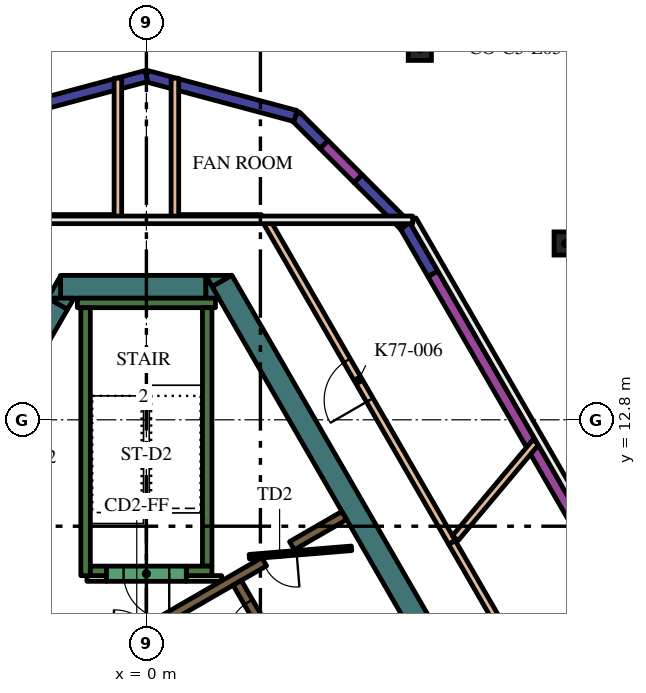
"""IFC4 building model, lengths in metres.
Left out: names, types, materials, properties, quantities, classifications, styles, units other than length and angle.
Written with IfcOpenShell. Run it as: python <this file> out.ifc"""

import sys

from ifc_helpers import new_model, si_unit, direction, frame, frame_2d, origin, origin_2d, place, context, subcontext, project, spatial, polyline, rectangle, hollow_circle, outline, extrude, element, fill, save


model = new_model("IFC4")
c1 = context("Model", 3, precision=1e-05, world=origin(), true_north=direction((0.0, 1.0)))
c2 = subcontext(c1, "Body", "Model", "MODEL_VIEW")
j1 = project(units=[si_unit("LENGTHUNIT", "METRE"), si_unit("PLANEANGLEUNIT", "RADIAN")], contexts=[c1])
p1 = place(None, origin())
s1 = spatial("IfcSite", under=j1, at=p1, CompositionType="ELEMENT")
p2 = place(p1, origin())
s2 = spatial("IfcBuilding", under=s1, at=p2, CompositionType="ELEMENT")
p3 = place(p2, frame((0.0, 0.0, 331.8)))
s3 = spatial("IfcBuildingStorey", under=s2, at=p3, CompositionType="ELEMENT", Elevation=331.8)
for number, where, z_axis, x_axis in (
    (1, (11.032, 17.44, 0.0), (0.0, 0.0, 1.0), (1.0, 0.0, 0.0)),
    (2, (7.195, 22.561, 0.0), (0.0, 0.0, 1.0), (1.0, 0.0, 0.0)),
):
    element("IfcColumn", number, at=place(p3, frame(where, z_axis=z_axis, x_axis=x_axis)), inside=s3, PredefinedType="COLUMN", context=c2, shape_type="SweptSolid", body=[
        extrude(hollow_circle(Radius=0.305, WallThickness=0.025, at=origin_2d()), origin(), (0.0, 0.0, 1.0), 4.2),
    ])
p4 = place(p3, frame((1.989, 16.456, 0.0), z_axis=(0.0, 0.0, 1.0), x_axis=(0.49999102663, -0.8660305845, 0.0)))
e3 = element("IfcWall", 3, at=p4, inside=s3, PredefinedType="SOLIDWALL", context=c2, shape_type="SweptSolid", body=[
    extrude(rectangle(XDim=12.406, YDim=0.6, at=frame_2d((6.203, 0.0))), origin(), (0.0, 0.0, 1.0), 4.2),
])
p5 = place(p3, origin())
e4 = element("IfcWall", 4, at=p5, inside=s3, PredefinedType="SOLIDWALL", context=c2, shape_type="SweptSolid", body=[
    extrude(outline(polyline([(1.559, 16.6), (2.235, 16.6), (1.728, 16.307), (1.559, 16.6)])), origin(), (0.0, 0.0, 1.0), 4.2),
])
p6 = place(p3, frame((-2.258, 16.3, 0.0), z_axis=(0.0, 0.0, 1.0), x_axis=(1.0, 0.0, 0.0)))
e5 = element("IfcWall", 5, at=p6, inside=s3, PredefinedType="SOLIDWALL", context=c2, shape_type="SweptSolid", body=[
    extrude(rectangle(XDim=3.823, YDim=0.6, at=frame_2d((1.912, 0.0))), origin(), (0.0, 0.0, 1.0), 4.2),
])
e6 = element("IfcWall", 6, at=p5, inside=s3, PredefinedType="SOLIDWALL", context=c2, shape_type="SweptSolid", body=[
    extrude(outline(polyline([(1.905, 16.0), (1.567, 16.0), (1.567, 16.585), (1.905, 16.0)])), origin(), (0.0, 0.0, 1.0), 4.2),
])
e7 = element("IfcWall", 7, at=p5, inside=s3, PredefinedType="SOLIDWALL", context=c2, shape_type="SweptSolid", body=[
    extrude(outline(polyline([(-2.598, 16.0), (-2.26, 16.585), (-2.26, 16.0), (-2.598, 16.0)])), origin(), (0.0, 0.0, 1.0), 4.2),
])
p7 = place(p3, frame((-2.335, 15.855, 0.0), z_axis=(0.0, 0.0, 1.0), x_axis=(-0.499960127962, -0.866048422692, 0.0)))
e8 = element("IfcWall", 8, at=p7, inside=s3, PredefinedType="SOLIDWALL", context=c2, shape_type="SweptSolid", body=[
    extrude(rectangle(XDim=2.934, YDim=0.6, at=frame_2d((1.467, 0.0))), origin(), (0.0, 0.0, 1.0), 4.2),
])
e9 = element("IfcWall", 9, at=p5, inside=s3, PredefinedType="SOLIDWALL", context=c2, shape_type="SweptSolid", body=[
    extrude(outline(polyline([(-1.905, 16.0), (-2.074, 15.707), (-2.581, 16.0), (-1.905, 16.0)])), origin(), (0.0, 0.0, 1.0), 4.2),
])
p8 = place(p3, frame((-1.817, 15.875, 0.0), z_axis=(0.0, 0.0, 1.0), x_axis=(1.0, 0.0, 0.0)))
e10 = element("IfcWall", 10, at=p8, inside=s3, PredefinedType="SOLIDWALL", context=c2, shape_type="SweptSolid", body=[
    extrude(rectangle(XDim=3.634, YDim=0.25, at=frame_2d((1.817, 0.0))), origin(), (0.0, 0.0, 1.0), 4.2),
])
p9 = place(p3, frame((1.6, 8.95, 0.0), z_axis=(0.0, 0.0, 1.0), x_axis=(0.0, 1.0, 0.0)))
e11 = element("IfcWall", 11, at=p9, inside=s3, PredefinedType="SOLIDWALL", context=c2, shape_type="SweptSolid", body=[
    extrude(rectangle(XDim=6.8, YDim=0.25, at=frame_2d((3.4, 0.0))), origin(), (0.0, 0.0, 1.0), 4.2),
])
p10 = place(p3, frame((1.05, 8.825, 0.0), z_axis=(0.0, 0.0, 1.0), x_axis=(1.0, 0.0, 0.0)))
e12 = element("IfcWall", 12, at=p10, inside=s3, PredefinedType="SOLIDWALL", context=c2, shape_type="SweptSolid", body=[
    extrude(rectangle(XDim=0.675, YDim=0.25, at=frame_2d((0.337, 0.0))), origin(), (0.0, 0.0, 1.0), 4.2),
])
p11 = place(p3, frame((-1.6, 8.7, 0.0), z_axis=(0.0, 0.0, 1.0), x_axis=(0.0, 1.0, 0.0)))
e13 = element("IfcWall", 13, at=p11, inside=s3, PredefinedType="SOLIDWALL", context=c2, shape_type="SweptSolid", body=[
    extrude(rectangle(XDim=7.05, YDim=0.25, at=frame_2d((3.525, 0.0))), origin(), (0.0, 0.0, 1.0), 4.2),
])
p12 = place(p3, frame((-1.475, 8.825, 0.0), z_axis=(0.0, 0.0, 1.0), x_axis=(1.0, 0.0, 0.0)))
e14 = element("IfcWall", 14, at=p12, inside=s3, PredefinedType="SOLIDWALL", context=c2, shape_type="SweptSolid", body=[
    extrude(rectangle(XDim=0.425, YDim=0.25, at=frame_2d((0.212, 0.0))), origin(), (0.0, 0.0, 1.0), 4.2),
])
p13 = place(p3, frame((3.1, 9.064, 0.0), z_axis=(0.0, 0.0, 1.0), x_axis=(-0.866033137035, -0.499986605379, 0.0)))
e15 = element("IfcWall", 15, at=p13, inside=s3, PredefinedType="SOLIDWALL", context=c2, shape_type="SweptSolid", body=[
    extrude(rectangle(XDim=3.467, YDim=0.25, at=frame_2d((1.733, 0.0))), origin(), (0.0, 0.0, 1.0), 4.2),
])
p14 = place(p3, frame((3.83, 9.486, 0.0), z_axis=(0.0, 0.0, 1.0), x_axis=(0.865986202621, 0.500067892261, 0.0)))
e16 = element("IfcWall", 16, at=p14, inside=s3, PredefinedType="SOLIDWALL", context=c2, shape_type="SweptSolid", body=[
    extrude(rectangle(XDim=1.591, YDim=0.25, at=frame_2d((0.795, 0.0))), origin(), (0.0, 0.0, 1.0), 4.2),
])
p15 = place(p3, frame((1.05, 8.625, 0.0), z_axis=(0.0, 0.0, 1.0), x_axis=(1.0, 0.0, 0.0)))
e17 = element("IfcWall", 17, at=p15, inside=s3, PredefinedType="PARTITIONING", context=c2, shape_type="SweptSolid", body=[
    extrude(rectangle(XDim=0.929, YDim=0.15, at=frame_2d((0.464, 0.0))), origin(), (0.0, 0.0, 1.0), 3.45),
])
p16 = place(p3, frame((-1.564, 8.625, 0.0), z_axis=(0.0, 0.0, 1.0), x_axis=(1.0, 0.0, 0.0)))
e18 = element("IfcWall", 18, at=p16, inside=s3, PredefinedType="PARTITIONING", context=c2, shape_type="SweptSolid", body=[
    extrude(rectangle(XDim=0.514, YDim=0.15, at=frame_2d((0.257, 0.0))), origin(), (0.0, 0.0, 1.0), 3.45),
])
p17 = place(p3, frame((8.565, -2.185, 0.0), z_axis=(0.0, 0.0, 1.0), x_axis=(-0.499997954832, 0.866026584559, 0.0)))
e19 = element("IfcWall", 19, at=p17, inside=s3, PredefinedType="SOLIDWALL", context=c2, shape_type="SweptSolid", body=[
    extrude(rectangle(XDim=12.35, YDim=0.25, at=frame_2d((6.175, 0.0))), origin(), (0.0, 0.0, 1.0), 4.2),
])
p18 = place(p17, frame((0.685, 0.0, 0.0)))
e20 = element("IfcOpeningElement", 20, at=p18, cuts=e19, PredefinedType="OPENING", context=c2, shape_type="SweptSolid", body=[
    extrude(rectangle(XDim=0.9, YDim=2.1, at=frame_2d((0.45, 1.05))), frame((0.0, 0.135, 0.0), z_axis=(0.0, -1.0, 0.0), x_axis=(1.0, 0.0, 0.0)), (0.0, 0.0, 1.0), 0.27),
])
p19 = place(p17, frame((3.105, 0.0, 0.0)))
e21 = element("IfcOpeningElement", 21, at=p19, cuts=e19, PredefinedType="OPENING", context=c2, shape_type="SweptSolid", body=[
    extrude(rectangle(XDim=1.1, YDim=2.1, at=frame_2d((0.55, 1.05))), frame((0.0, 0.135, 0.0), z_axis=(0.0, -1.0, 0.0), x_axis=(1.0, 0.0, 0.0)), (0.0, 0.0, 1.0), 0.27),
])
p20 = place(p17, frame((5.625, 0.0, 0.0)))
e22 = element("IfcOpeningElement", 22, at=p20, cuts=e19, PredefinedType="OPENING", context=c2, shape_type="SweptSolid", body=[
    extrude(rectangle(XDim=1.1, YDim=2.1, at=frame_2d((0.55, 1.05))), frame((0.0, 0.135, 0.0), z_axis=(0.0, -1.0, 0.0), x_axis=(1.0, 0.0, 0.0)), (0.0, 0.0, 1.0), 0.27),
])
p21 = place(p17, frame((8.145, 0.0, 0.0)))
e23 = element("IfcOpeningElement", 23, at=p21, cuts=e19, PredefinedType="OPENING", context=c2, shape_type="SweptSolid", body=[
    extrude(rectangle(XDim=1.1, YDim=2.1, at=frame_2d((0.55, 1.05))), frame((0.0, 0.135, 0.0), z_axis=(0.0, -1.0, 0.0), x_axis=(1.0, 0.0, 0.0)), (0.0, 0.0, 1.0), 0.27),
])
p22 = place(p17, frame((10.665, 0.0, 0.0)))
e24 = element("IfcOpeningElement", 24, at=p22, cuts=e19, PredefinedType="OPENING", context=c2, shape_type="SweptSolid", body=[
    extrude(rectangle(XDim=1.1, YDim=2.1, at=frame_2d((0.55, 1.05))), frame((0.0, 0.135, 0.0), z_axis=(0.0, -1.0, 0.0), x_axis=(1.0, 0.0, 0.0)), (0.0, 0.0, 1.0), 0.27),
])
p23 = place(p3, frame((1.05, 8.75, 0.0), z_axis=(0.0, 0.0, 1.0), x_axis=(-1.0, 0.0, 0.0)))
e25 = element("IfcWall", 25, at=p23, inside=s3, PredefinedType="SOLIDWALL", context=c2, shape_type="SweptSolid", body=[
    extrude(rectangle(XDim=2.1, YDim=0.4, at=frame_2d((1.05, 0.0))), origin(), (0.0, 0.0, 1.0), 4.2),
])
p24 = place(p23, frame((0.45, 0.0, 0.0)))
e26 = element("IfcOpeningElement", 26, at=p24, cuts=e25, PredefinedType="OPENING", context=c2, shape_type="SweptSolid", body=[
    extrude(rectangle(XDim=1.2, YDim=2.1, at=frame_2d((0.6, 1.05))), frame((0.0, 0.21, 0.0), z_axis=(0.0, -1.0, 0.0), x_axis=(1.0, 0.0, 0.0)), (0.0, 0.0, 1.0), 0.42),
])
p25 = place(p3, frame((5.398, 9.419, 0.0), z_axis=(0.0, 0.0, 1.0), x_axis=(-0.996653416376, -0.081743303248, 0.0)))
e27 = element("IfcWall", 27, at=p25, inside=s3, PredefinedType="PARTITIONING", context=c2, shape_type="SweptSolid", body=[
    extrude(rectangle(XDim=2.7, YDim=0.12, at=frame_2d((1.35, 0.0))), origin(), (0.0, 0.0, 1.0), 3.45),
])
p26 = place(p25, frame((1.45, 0.0, 0.0)))
e28 = element("IfcOpeningElement", 28, at=p26, cuts=e27, PredefinedType="OPENING", context=c2, shape_type="SweptSolid", body=[
    extrude(rectangle(XDim=0.9, YDim=2.1, at=frame_2d((0.45, 1.05))), frame((0.0, 0.07, 0.0), z_axis=(0.0, -1.0, 0.0), x_axis=(1.0, 0.0, 0.0)), (0.0, 0.0, 1.0), 0.14),
])
p27 = place(p3, frame((8.038, 9.579, 0.0), z_axis=(0.0, 0.0, 1.0), x_axis=(-0.500003092839, 0.866023618125, 0.0)))
e29 = element("IfcWall", 29, at=p27, inside=s3, PredefinedType="PARTITIONING", context=c2, shape_type="SweptSolid", body=[
    extrude(rectangle(XDim=9.84, YDim=0.2, at=frame_2d((4.92, 0.0))), origin(), (0.0, 0.0, 1.0), 3.45),
])
p28 = place(p27, frame((4.32, 0.0, 0.0)))
e30 = element("IfcOpeningElement", 30, at=p28, cuts=e29, PredefinedType="OPENING", context=c2, shape_type="SweptSolid", body=[
    extrude(rectangle(XDim=1.2, YDim=2.1, at=frame_2d((0.6, 1.05))), frame((0.0, 0.11, 0.0), z_axis=(0.0, -1.0, 0.0), x_axis=(1.0, 0.0, 0.0)), (0.0, 0.0, 1.0), 0.22),
])
p29 = place(p3, frame((12.309, 2.18, 0.0), z_axis=(0.0, 0.0, 1.0), x_axis=(-0.499966798825, 0.866044571643, 0.0)))
e31 = element("IfcWall", 31, at=p29, inside=s3, PredefinedType="PARTITIONING", context=c2, shape_type="SweptSolid", body=[
    extrude(rectangle(XDim=8.534, YDim=0.2, at=frame_2d((4.267, 0.0))), origin(), (0.0, 0.0, 1.0), 3.45),
])
p30 = place(p29, frame((3.667, 0.0, 0.0)))
e32 = element("IfcOpeningElement", 32, at=p30, cuts=e31, PredefinedType="OPENING", context=c2, shape_type="SweptSolid", body=[
    extrude(rectangle(XDim=1.2, YDim=2.1, at=frame_2d((0.6, 1.05))), frame((0.0, 0.11, 0.0), z_axis=(0.0, -1.0, 0.0), x_axis=(1.0, 0.0, 0.0)), (0.0, 0.0, 1.0), 0.22),
])
for number, where, z_axis, x_axis in (
    (33, (0.75, 21.789, 0.0), (0.0, 0.0, 1.0), (0.0, -1.0, 0.0)),
    (34, (-0.75, 18.1, 0.0), (0.0, 0.0, 1.0), (0.0, 1.0, 0.0)),
):
    element("IfcWall", number, at=place(p3, frame(where, z_axis=z_axis, x_axis=x_axis)), inside=s3, PredefinedType="PARTITIONING", context=c2, shape_type="SweptSolid", body=[
        extrude(rectangle(XDim=3.688, YDim=0.2, at=frame_2d((1.844, 0.0))), origin(), (0.0, 0.0, 1.0), 3.45),
    ])
p31 = place(p3, frame((8.127, 9.686, 0.0), z_axis=(0.0, 0.0, 1.0), x_axis=(0.642778991378, 0.766051674656, 0.0)))
e35 = element("IfcWall", 35, at=p31, inside=s3, PredefinedType="PARTITIONING", context=c2, shape_type="SweptSolid", body=[
    extrude(rectangle(XDim=3.3, YDim=0.2, at=frame_2d((1.65, 0.0))), origin(), (0.0, 0.0, 1.0), 3.45),
])
for number, where, z_axis, x_axis in (
    (36, (-3.028, 18.1, 0.0), (0.0, 0.0, 1.0), (1.0, 0.0, 0.0)),
    (37, (0.85, 18.1, 0.0), (0.0, 0.0, 1.0), (1.0, 0.0, 0.0)),
):
    element("IfcWall", number, at=place(p3, frame(where, z_axis=z_axis, x_axis=x_axis)), inside=s3, PredefinedType="PARTITIONING", context=c2, shape_type="SweptSolid", body=[
        extrude(rectangle(XDim=2.177, YDim=0.2, at=frame_2d((1.089, 0.0))), origin(), (0.0, 0.0, 1.0), 3.45),
    ])
p32 = place(p3, frame((18.181, -1.79, 0.0), z_axis=(0.0, 0.0, 1.0), x_axis=(-0.500002158106, 0.866024157798, 0.0)))
e38 = element("IfcWall", 38, at=p32, inside=s3, PredefinedType="SOLIDWALL", context=c2, shape_type="SweptSolid", body=[
    extrude(rectangle(XDim=21.282, YDim=0.3, at=frame_2d((10.641, 0.0))), origin(), (0.0, 0.0, 1.0), 3.45),
])
p33 = place(p3, frame((7.54, 16.64, 0.0), z_axis=(0.0, 0.0, 1.0), x_axis=(-0.499977492351, 0.866038398192, 0.0)))
e39 = element("IfcWall", 39, at=p33, inside=s3, PredefinedType="SOLIDWALL", context=c2, shape_type="SweptSolid", body=[
    extrude(rectangle(XDim=1.464, YDim=0.3, at=frame_2d((0.732, 0.0))), origin(), (0.0, 0.0, 1.0), 3.95),
])
p34 = place(p3, frame((6.808, 17.908, 0.0), z_axis=(0.0, 0.0, 1.0), x_axis=(-0.707106781187, 0.707106781187, 0.0)))
e40 = element("IfcWall", 40, at=p34, inside=s3, PredefinedType="SOLIDWALL", context=c2, shape_type="SweptSolid", body=[
    extrude(rectangle(XDim=1.752, YDim=0.3, at=frame_2d((0.876, 0.0))), origin(), (0.0, 0.0, 1.0), 3.95),
])
p35 = place(p3, frame((5.569, 19.147, 0.0), z_axis=(0.0, 0.0, 1.0), x_axis=(-0.707106781187, 0.707106781187, 0.0)))
e41 = element("IfcWall", 41, at=p35, inside=s3, PredefinedType="SOLIDWALL", context=c2, shape_type="SweptSolid", body=[
    extrude(rectangle(XDim=1.264, YDim=0.3, at=frame_2d((0.632, 0.0))), origin(), (0.0, 0.0, 1.0), 3.45),
])
p36 = place(p3, frame((4.675, 20.041, 0.0), z_axis=(0.0, 0.0, 1.0), x_axis=(-0.707106781187, 0.707106781187, 0.0)))
e42 = element("IfcWall", 42, at=p36, inside=s3, PredefinedType="SOLIDWALL", context=c2, shape_type="SweptSolid", body=[
    extrude(rectangle(XDim=1.065, YDim=0.3, at=frame_2d((0.532, 0.0))), origin(), (0.0, 0.0, 1.0), 3.95),
])
for number, where, z_axis, x_axis in (
    (43, (3.922, 20.794, 0.0), (0.0, 0.0, 1.0), (-0.966, 0.259, 0.0)),
    (44, (0.0, 21.845, 0.0), (0.0, 0.0, 1.0), (-0.966, -0.259, 0.0)),
):
    element("IfcWall", number, at=place(p3, frame(where, z_axis=z_axis, x_axis=x_axis)), inside=s3, PredefinedType="SOLIDWALL", context=c2, shape_type="SweptSolid", body=[
        extrude(rectangle(XDim=4.061, YDim=0.3, at=frame_2d((2.03, 0.0))), origin(), (0.0, 0.0, 1.0), 3.95),
    ])
p37 = place(p22, origin())
e45 = element("IfcDoor", 45, at=p37, inside=s3, OperationType="DOUBLE_DOOR_SLIDING", PredefinedType="DOOR", context=c2, shape_type="SweptSolid", body=[
    extrude(rectangle(XDim=1.1, YDim=2.1, at=frame_2d((0.55, 1.05))), frame((0.0, 0.025, 0.0), z_axis=(0.0, -1.0, 0.0), x_axis=(1.0, 0.0, 0.0)), (0.0, 0.0, 1.0), 0.05),
])
fill(e24, e45)
p38 = place(p24, origin())
e46 = element("IfcDoor", 46, at=p38, inside=s3, OperationType="SINGLE_SWING_LEFT", PredefinedType="DOOR", context=c2, shape_type="SweptSolid", body=[
    extrude(rectangle(XDim=1.2, YDim=2.1, at=frame_2d((0.6, 1.05))), frame((0.0, 0.025, 0.0), z_axis=(0.0, -1.0, 0.0), x_axis=(1.0, 0.0, 0.0)), (0.0, 0.0, 1.0), 0.05),
])
fill(e26, e46)
p39 = place(p26, origin())
e47 = element("IfcDoor", 47, at=p39, inside=s3, OperationType="SINGLE_SWING_LEFT", PredefinedType="DOOR", context=c2, shape_type="SweptSolid", body=[
    extrude(rectangle(XDim=0.9, YDim=2.1, at=frame_2d((0.45, 1.05))), frame((0.0, 0.025, 0.0), z_axis=(0.0, -1.0, 0.0), x_axis=(1.0, 0.0, 0.0)), (0.0, 0.0, 1.0), 0.05),
])
fill(e28, e47)
p40 = place(p28, origin())
e48 = element("IfcDoor", 48, at=p40, inside=s3, OperationType="SINGLE_SWING_RIGHT", PredefinedType="DOOR", context=c2, shape_type="SweptSolid", body=[
    extrude(rectangle(XDim=1.2, YDim=2.1, at=frame_2d((0.6, 1.05))), frame((0.0, 0.025, 0.0), z_axis=(0.0, -1.0, 0.0), x_axis=(1.0, 0.0, 0.0)), (0.0, 0.0, 1.0), 0.05),
])
fill(e30, e48)
save(model, sys.argv[1])
